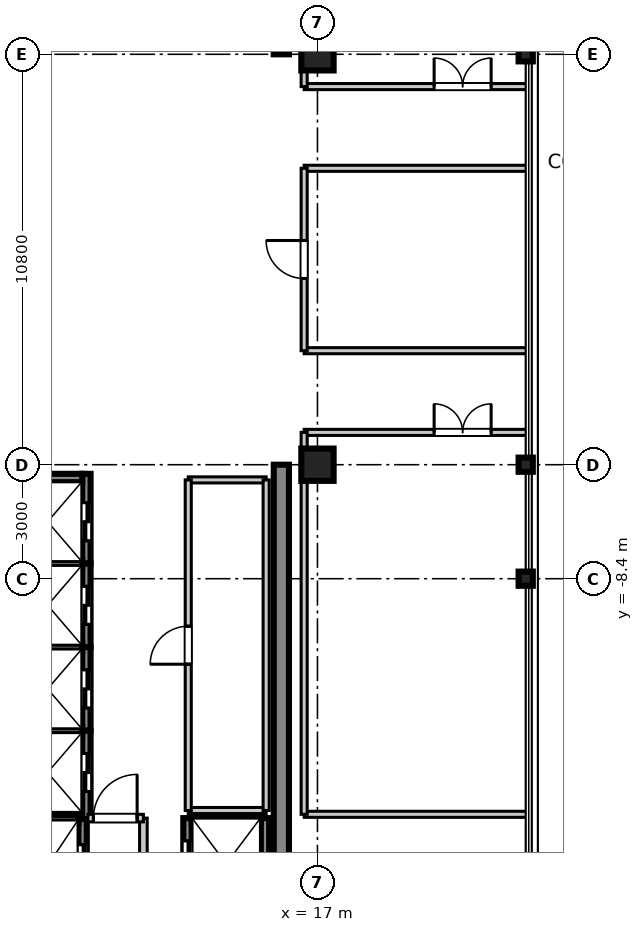
"""IFC4 building model, lengths in metres.
Left out: names, types, materials, properties, quantities, classifications, styles, units other than length and angle.
Written with IfcOpenShell. Run it as: python <this file> out.ifc"""

import sys

from ifc_helpers import new_model, si_unit, direction, frame, frame_2d, origin, origin_2d, place, context, subcontext, project, spatial, rectangle, i_section, extrude, source, transform, mapped, element, fill, save


model = new_model("IFC4")
c1 = context("Model", 3, precision=1e-05, world=origin(), true_north=direction((0.0, 1.0)))
c2 = subcontext(c1, "Body", "Model", "MODEL_VIEW")
j1 = project(units=[si_unit("LENGTHUNIT", "METRE"), si_unit("PLANEANGLEUNIT", "RADIAN")], contexts=[c1])
p1 = place(None, origin())
s1 = spatial("IfcSite", under=j1, at=p1, CompositionType="ELEMENT")
p2 = place(p1, origin())
s2 = spatial("IfcBuilding", under=s1, at=p2, CompositionType="ELEMENT")
p3 = place(p2, frame((0.0, 0.0, 343.05)))
s3 = spatial("IfcBuildingStorey", under=s2, at=p3, CompositionType="ELEMENT", Elevation=343.05)
m1 = source(origin(), c2, "Body", "SweptSolid", [
    extrude(rectangle(XDim=0.85, YDim=0.85, at=origin_2d()), origin(), (0.0, 0.0, 1.0), 4.455),
])
for number, where, z_axis, x_axis in (
    (1, (17.0, -5.4, 0.0), (0.0, 0.0, 1.0), (1.0, 0.0, 0.0)),
    (2, (17.0, 5.4, 0.0), (0.0, 0.0, 1.0), (1.0, 0.0, 0.0)),
):
    element("IfcColumn", number, at=place(p3, frame(where, z_axis=z_axis, x_axis=x_axis)), inside=s3, PredefinedType="PILASTER", context=c2, shape_type="MappedRepresentation", body=[
        mapped(m1, transform((0.0, 0.0, 0.0), scale=1.0)),
    ])
m2 = source(origin(), c2, "Body", "SweptSolid", [
    extrude(i_section(OverallWidth=0.374, OverallDepth=0.374, WebThickness=0.014, FlangeThickness=0.023, at=origin_2d()), origin(), (0.0, 0.0, 1.0), 4.455),
])
for number, where, z_axis, x_axis in (
    (3, (22.48, -8.4, 0.0), (0.0, 0.0, 1.0), (1.0, 0.0, 0.0)),
    (4, (22.48, -5.4, 0.0), (0.0, 0.0, 1.0), (1.0, 0.0, 0.0)),
    (5, (22.48, 5.4, 0.0), (0.0, 0.0, 1.0), (1.0, 0.0, 0.0)),
):
    element("IfcColumn", number, at=place(p3, frame(where, z_axis=z_axis, x_axis=x_axis)), inside=s3, PredefinedType="COLUMN", context=c2, shape_type="MappedRepresentation", body=[
        mapped(m2, transform((0.0, 0.0, 0.0), scale=1.0)),
    ])
m3 = source(origin(), c2, "Body", "SweptSolid", [
    extrude(rectangle(XDim=11.6, YDim=0.4, at=frame_2d((5.8, 0.0))), origin(), (0.0, 0.0, 1.0), 4.17),
])
for number, where, z_axis, x_axis in (
    (6, (16.05, 5.4, 0.0), (0.0, 0.0, 1.0), (0.0, 1.0, 0.0)),
    (7, (16.05, -17.0, 0.0), (0.0, 0.0, 1.0), (0.0, 1.0, 0.0)),
):
    element("IfcWall", number, at=place(p3, frame(where, z_axis=z_axis, x_axis=x_axis)), inside=s3, PredefinedType="SHEAR", context=c2, shape_type="MappedRepresentation", body=[
        mapped(m3, transform((0.0, 0.0, 0.0), scale=1.0)),
    ])
m4 = source(origin(), c2, "Body", "SweptSolid", [
    extrude(rectangle(XDim=2.36, YDim=0.22, at=frame_2d((1.18, 0.0))), origin(), (0.0, 0.0, 1.0), 4.17),
])
p4 = place(p3, frame((10.92, -8.0, 0.0), z_axis=(0.0, 0.0, 1.0), x_axis=(0.0, 1.0, 0.0)))
e8 = element("IfcWall", 8, at=p4, inside=s3, PredefinedType="SHEAR", context=c2, shape_type="MappedRepresentation", body=[
    mapped(m4, transform((0.0, 0.0, 0.0), scale=1.0)),
])
p5 = place(p4, frame((0.6, 0.0, 0.0)))
e9 = element("IfcOpeningElement", 9, at=p5, cuts=e8, PredefinedType="OPENING", context=c2, shape_type="SweptSolid", body=[
    extrude(rectangle(XDim=1.0, YDim=2.2, at=frame_2d((0.5, 1.1))), frame((0.0, 0.12, 0.0), z_axis=(0.0, -1.0, 0.0), x_axis=(1.0, 0.0, 0.0)), (0.0, 0.0, 1.0), 0.24),
])
m5 = source(origin(), c2, "Body", "SweptSolid", [
    extrude(rectangle(XDim=1.82, YDim=0.22, at=frame_2d((0.91, 0.0))), origin(), (0.0, 0.0, 1.0), 4.17),
])
p6 = place(p3, frame((8.99, -5.75, 0.0), z_axis=(0.0, 0.0, 1.0), x_axis=(1.0, 0.0, 0.0)))
e10 = element("IfcWall", 10, at=p6, inside=s3, PredefinedType="SHEAR", context=c2, shape_type="MappedRepresentation", body=[
    mapped(m5, transform((0.0, 0.0, 0.0), scale=1.0)),
])
m6 = source(origin(), c2, "Body", "SweptSolid", [
    extrude(rectangle(XDim=2.2, YDim=0.22, at=frame_2d((1.1, 0.0))), origin(), (0.0, 0.0, 1.0), 4.17),
])
p7 = place(p3, frame((10.92, -10.2, 0.0), z_axis=(0.0, 0.0, 1.0), x_axis=(0.0, 1.0, 0.0)))
e11 = element("IfcWall", 11, at=p7, inside=s3, PredefinedType="SHEAR", context=c2, shape_type="MappedRepresentation", body=[
    mapped(m6, transform((0.0, 0.0, 0.0), scale=1.0)),
])
p8 = place(p7, frame((0.6, 0.0, 0.0)))
e12 = element("IfcOpeningElement", 12, at=p8, cuts=e11, PredefinedType="OPENING", context=c2, shape_type="SweptSolid", body=[
    extrude(rectangle(XDim=1.0, YDim=2.2, at=frame_2d((0.5, 1.1))), frame((0.0, 0.12, 0.0), z_axis=(0.0, -1.0, 0.0), x_axis=(1.0, 0.0, 0.0)), (0.0, 0.0, 1.0), 0.24),
])
m7 = source(origin(), c2, "Body", "SweptSolid", [
    extrude(rectangle(XDim=1.82, YDim=0.22, at=frame_2d((0.91, 0.0))), origin(), (0.0, 0.0, 1.0), 4.5),
])
p9 = place(p3, frame((8.99, -8.0, 0.0), z_axis=(0.0, 0.0, 1.0), x_axis=(1.0, 0.0, 0.0)))
e13 = element("IfcWall", 13, at=p9, inside=s3, PredefinedType="SHEAR", context=c2, shape_type="MappedRepresentation", body=[
    mapped(m7, transform((0.0, 0.0, 0.0), scale=1.0)),
])
p10 = place(p3, frame((10.92, -12.4, 0.0), z_axis=(0.0, 0.0, 1.0), x_axis=(0.0, 1.0, 0.0)))
e14 = element("IfcWall", 14, at=p10, inside=s3, PredefinedType="SHEAR", context=c2, shape_type="MappedRepresentation", body=[
    mapped(m6, transform((0.0, 0.0, 0.0), scale=1.0)),
])
p11 = place(p10, frame((0.6, 0.0, 0.0)))
e15 = element("IfcOpeningElement", 15, at=p11, cuts=e14, PredefinedType="OPENING", context=c2, shape_type="SweptSolid", body=[
    extrude(rectangle(XDim=1.0, YDim=2.2, at=frame_2d((0.5, 1.1))), frame((0.0, 0.12, 0.0), z_axis=(0.0, -1.0, 0.0), x_axis=(1.0, 0.0, 0.0)), (0.0, 0.0, 1.0), 0.24),
])
p12 = place(p3, frame((8.99, -10.2, 0.0), z_axis=(0.0, 0.0, 1.0), x_axis=(1.0, 0.0, 0.0)))
e16 = element("IfcWall", 16, at=p12, inside=s3, PredefinedType="SHEAR", context=c2, shape_type="MappedRepresentation", body=[
    mapped(m7, transform((0.0, 0.0, 0.0), scale=1.0)),
])
m8 = source(origin(), c2, "Body", "SweptSolid", [
    extrude(rectangle(XDim=2.325, YDim=0.22, at=frame_2d((1.163, 0.0))), origin(), (0.0, 0.0, 1.0), 4.17),
])
p13 = place(p3, frame((10.92, -14.725, 0.0), z_axis=(0.0, 0.0, 1.0), x_axis=(0.0, 1.0, 0.0)))
e17 = element("IfcWall", 17, at=p13, inside=s3, PredefinedType="SHEAR", context=c2, shape_type="MappedRepresentation", body=[
    mapped(m8, transform((0.0, 0.0, 0.0), scale=1.0)),
])
p14 = place(p13, frame((0.725, 0.0, 0.0)))
e18 = element("IfcOpeningElement", 18, at=p14, cuts=e17, PredefinedType="OPENING", context=c2, shape_type="SweptSolid", body=[
    extrude(rectangle(XDim=1.0, YDim=2.2, at=frame_2d((0.5, 1.1))), frame((0.0, 0.12, 0.0), z_axis=(0.0, -1.0, 0.0), x_axis=(1.0, 0.0, 0.0)), (0.0, 0.0, 1.0), 0.24),
])
p15 = place(p3, frame((8.99, -12.4, 0.0), z_axis=(0.0, 0.0, 1.0), x_axis=(1.0, 0.0, 0.0)))
e19 = element("IfcWall", 19, at=p15, inside=s3, PredefinedType="SHEAR", context=c2, shape_type="MappedRepresentation", body=[
    mapped(m7, transform((0.0, 0.0, 0.0), scale=1.0)),
])
m9 = source(origin(), c2, "Body", "SweptSolid", [
    extrude(rectangle(XDim=2.635, YDim=0.22, at=frame_2d((1.317, 0.0))), origin(), (0.0, 0.0, 1.0), 4.17),
])
p16 = place(p3, frame((10.82, -17.36, 0.0), z_axis=(0.0, 0.0, 1.0), x_axis=(0.0, 1.0, 0.0)))
e20 = element("IfcWall", 20, at=p16, inside=s3, PredefinedType="SHEAR", context=c2, shape_type="MappedRepresentation", body=[
    mapped(m9, transform((0.0, 0.0, 0.0), scale=1.0)),
])
p17 = place(p16, frame((0.86, 0.0, 0.0)))
e21 = element("IfcOpeningElement", 21, at=p17, cuts=e20, PredefinedType="OPENING", context=c2, shape_type="SweptSolid", body=[
    extrude(rectangle(XDim=1.1, YDim=2.2, at=frame_2d((0.55, 1.1))), frame((0.0, 0.12, 0.0), z_axis=(0.0, -1.0, 0.0), x_axis=(1.0, 0.0, 0.0)), (0.0, 0.0, 1.0), 0.24),
])
m10 = source(origin(), c2, "Body", "SweptSolid", [
    extrude(rectangle(XDim=1.62, YDim=0.22, at=frame_2d((0.81, 0.0))), origin(), (0.0, 0.0, 1.0), 4.5),
])
p18 = place(p3, frame((9.09, -14.725, 0.0), z_axis=(0.0, 0.0, 1.0), x_axis=(1.0, 0.0, 0.0)))
e22 = element("IfcWall", 22, at=p18, inside=s3, PredefinedType="SHEAR", context=c2, shape_type="MappedRepresentation", body=[
    mapped(m10, transform((0.0, 0.0, 0.0), scale=1.0)),
])
m11 = source(origin(), c2, "Body", "SweptSolid", [
    extrude(rectangle(XDim=2.61, YDim=0.22, at=frame_2d((1.305, 0.0))), origin(), (0.0, 0.0, 1.0), 4.17),
])
p19 = place(p3, frame((13.58, -17.31, 0.0), z_axis=(0.0, 0.0, 1.0), x_axis=(0.0, 1.0, 0.0)))
e23 = element("IfcWall", 23, at=p19, inside=s3, PredefinedType="SHEAR", context=c2, shape_type="MappedRepresentation", body=[
    mapped(m11, transform((0.0, 0.0, 0.0), scale=1.0)),
])
p20 = place(p19, frame((0.81, 0.0, 0.0)))
e24 = element("IfcOpeningElement", 24, at=p20, cuts=e23, PredefinedType="OPENING", context=c2, shape_type="SweptSolid", body=[
    extrude(rectangle(XDim=1.2, YDim=2.2, at=frame_2d((0.6, 1.1))), frame((0.0, 0.12, 0.0), z_axis=(0.0, -1.0, 0.0), x_axis=(1.0, 0.0, 0.0)), (0.0, 0.0, 1.0), 0.24),
])
p21 = place(p3, frame((15.62, -17.31, 0.0), z_axis=(0.0, 0.0, 1.0), x_axis=(0.0, 1.0, 0.0)))
e25 = element("IfcWall", 25, at=p21, inside=s3, PredefinedType="SHEAR", context=c2, shape_type="MappedRepresentation", body=[
    mapped(m11, transform((0.0, 0.0, 0.0), scale=1.0)),
])
p22 = place(p3, frame((13.69, -14.7, 0.0), z_axis=(0.0, 0.0, 1.0), x_axis=(1.0, 0.0, 0.0)))
e26 = element("IfcWall", 26, at=p22, inside=s3, PredefinedType="SHEAR", context=c2, shape_type="MappedRepresentation", body=[
    mapped(m7, transform((0.0, 0.0, 0.0), scale=1.0)),
])
m12 = source(origin(), c2, "Body", "SweptSolid", [
    extrude(rectangle(XDim=5.1, YDim=0.2, at=frame_2d((2.55, 0.0))), origin(), (0.0, 0.0, 1.0), 3.4),
])
p23 = place(p3, frame((12.42, -19.8, 0.0), z_axis=(0.0, 0.0, 1.0), x_axis=(0.0, 1.0, 0.0)))
e27 = element("IfcWall", 27, at=p23, inside=s3, PredefinedType="PARTITIONING", context=c2, shape_type="MappedRepresentation", body=[
    mapped(m12, transform((0.0, 0.0, 0.0), scale=1.0)),
])
m13 = source(origin(), c2, "Body", "SweptSolid", [
    extrude(rectangle(XDim=1.46, YDim=0.2, at=frame_2d((0.73, 0.0))), origin(), (0.0, 0.0, 1.0), 3.4),
])
p24 = place(p3, frame((10.96, -14.7, 0.0), z_axis=(0.0, 0.0, 1.0), x_axis=(1.0, 0.0, 0.0)))
e28 = element("IfcWall", 28, at=p24, inside=s3, PredefinedType="PARTITIONING", context=c2, shape_type="MappedRepresentation", body=[
    mapped(m13, transform((0.0, 0.0, 0.0), scale=1.0)),
])
p25 = place(p24, frame((0.145, 0.0, 0.0)))
e29 = element("IfcOpeningElement", 29, at=p25, cuts=e28, PredefinedType="OPENING", context=c2, shape_type="SweptSolid", body=[
    extrude(rectangle(XDim=1.15, YDim=2.15, at=frame_2d((0.575, 1.075))), frame((0.0, 0.11, 0.0), z_axis=(0.0, -1.0, 0.0), x_axis=(1.0, 0.0, 0.0)), (0.0, 0.0, 1.0), 0.22),
])
m14 = source(origin(), c2, "Body", "SweptSolid", [
    extrude(rectangle(XDim=2.05, YDim=0.16, at=frame_2d((1.025, 0.0))), origin(), (0.0, 0.0, 1.0), 3.4),
])
for number, where, z_axis, x_axis in (
    (30, (13.6, -14.5, 0.0), (0.0, 0.0, 1.0), (1.0, 0.0, 0.0)),
    (31, (13.6, -5.8, 0.0), (0.0, 0.0, 1.0), (1.0, 0.0, 0.0)),
):
    element("IfcWall", number, at=place(p3, frame(where, z_axis=z_axis, x_axis=x_axis)), inside=s3, PredefinedType="PARTITIONING", context=c2, shape_type="MappedRepresentation", body=[
        mapped(m14, transform((0.0, 0.0, 0.0), scale=1.0)),
    ])
m15 = source(origin(), c2, "Body", "SweptSolid", [
    extrude(rectangle(XDim=8.7, YDim=0.16, at=frame_2d((4.35, 0.0))), origin(), (0.0, 0.0, 1.0), 3.4),
])
p26 = place(p3, frame((13.6, -14.5, 0.0), z_axis=(0.0, 0.0, 1.0), x_axis=(0.0, 1.0, 0.0)))
e32 = element("IfcWall", 32, at=p26, inside=s3, PredefinedType="PARTITIONING", context=c2, shape_type="MappedRepresentation", body=[
    mapped(m15, transform((0.0, 0.0, 0.0), scale=1.0)),
])
p27 = place(p26, frame((3.85, 0.0, 0.0)))
e33 = element("IfcOpeningElement", 33, at=p27, cuts=e32, PredefinedType="OPENING", context=c2, shape_type="SweptSolid", body=[
    extrude(rectangle(XDim=1.0, YDim=2.1, at=frame_2d((0.5, 1.05))), frame((0.0, 0.09, 0.0), z_axis=(0.0, -1.0, 0.0), x_axis=(1.0, 0.0, 0.0)), (0.0, 0.0, 1.0), 0.18),
])
p28 = place(p3, frame((15.65, -14.5, 0.0), z_axis=(0.0, 0.0, 1.0), x_axis=(0.0, 1.0, 0.0)))
e34 = element("IfcWall", 34, at=p28, inside=s3, PredefinedType="PARTITIONING", context=c2, shape_type="MappedRepresentation", body=[
    mapped(m15, transform((0.0, 0.0, 0.0), scale=1.0)),
])
m16 = source(origin(), c2, "Body", "SweptSolid", [
    extrude(rectangle(XDim=5.85, YDim=0.16, at=frame_2d((2.925, 0.0))), origin(), (0.0, 0.0, 1.0), 3.4),
])
for number, where, z_axis, x_axis in (
    (35, (16.65, -2.4, 0.0), (0.0, 0.0, 1.0), (1.0, 0.0, 0.0)),
    (36, (16.65, 2.4, 0.0), (0.0, 0.0, 1.0), (1.0, 0.0, 0.0)),
):
    element("IfcWall", number, at=place(p3, frame(where, z_axis=z_axis, x_axis=x_axis)), inside=s3, PredefinedType="PARTITIONING", context=c2, shape_type="MappedRepresentation", body=[
        mapped(m16, transform((0.0, 0.0, 0.0), scale=1.0)),
    ])
m17 = source(origin(), c2, "Body", "SweptSolid", [
    extrude(rectangle(XDim=4.8, YDim=0.16, at=frame_2d((2.4, 0.0))), origin(), (0.0, 0.0, 1.0), 3.4),
])
p29 = place(p3, frame((16.65, -2.4, 0.0), z_axis=(0.0, 0.0, 1.0), x_axis=(0.0, 1.0, 0.0)))
e37 = element("IfcWall", 37, at=p29, inside=s3, PredefinedType="PARTITIONING", context=c2, shape_type="MappedRepresentation", body=[
    mapped(m17, transform((0.0, 0.0, 0.0), scale=1.0)),
])
p30 = place(p29, frame((1.9, 0.0, 0.0)))
e38 = element("IfcOpeningElement", 38, at=p30, cuts=e37, PredefinedType="OPENING", context=c2, shape_type="SweptSolid", body=[
    extrude(rectangle(XDim=1.0, YDim=2.1, at=frame_2d((0.5, 1.05))), frame((0.0, 0.09, 0.0), z_axis=(0.0, -1.0, 0.0), x_axis=(1.0, 0.0, 0.0)), (0.0, 0.0, 1.0), 0.18),
])
p31 = place(p3, frame((16.65, 4.55, 0.0), z_axis=(0.0, 0.0, 1.0), x_axis=(1.0, 0.0, 0.0)))
e39 = element("IfcWall", 39, at=p31, inside=s3, PredefinedType="PARTITIONING", context=c2, shape_type="MappedRepresentation", body=[
    mapped(m16, transform((0.0, 0.0, 0.0), scale=1.0)),
])
p32 = place(p31, frame((3.42, 0.0, 0.0)))
e40 = element("IfcOpeningElement", 40, at=p32, cuts=e39, PredefinedType="OPENING", context=c2, shape_type="SweptSolid", body=[
    extrude(rectangle(XDim=1.5, YDim=2.15, at=frame_2d((0.75, 1.075))), frame((0.0, 0.09, 0.0), z_axis=(0.0, -1.0, 0.0), x_axis=(1.0, 0.0, 0.0)), (0.0, 0.0, 1.0), 0.18),
])
m18 = source(origin(), c2, "Body", "SweptSolid", [
    extrude(rectangle(XDim=17.95, YDim=0.16, at=frame_2d((8.975, 0.0))), origin(), (0.0, 0.0, 1.0), 3.4),
])
p33 = place(p3, frame((16.65, 4.55, 0.0), z_axis=(0.0, 0.0, 1.0), x_axis=(0.0, 1.0, 0.0)))
e41 = element("IfcWall", 41, at=p33, inside=s3, PredefinedType="PARTITIONING", context=c2, shape_type="MappedRepresentation", body=[
    mapped(m18, transform((0.0, 0.0, 0.0), scale=1.0)),
])
p34 = place(p3, frame((16.65, -14.6, 0.0), z_axis=(0.0, 0.0, 1.0), x_axis=(1.0, 0.0, 0.0)))
e42 = element("IfcWall", 42, at=p34, inside=s3, PredefinedType="PARTITIONING", context=c2, shape_type="MappedRepresentation", body=[
    mapped(m16, transform((0.0, 0.0, 0.0), scale=1.0)),
])
p35 = place(p3, frame((16.65, -4.55, 0.0), z_axis=(0.0, 0.0, 1.0), x_axis=(1.0, 0.0, 0.0)))
e43 = element("IfcWall", 43, at=p35, inside=s3, PredefinedType="PARTITIONING", context=c2, shape_type="MappedRepresentation", body=[
    mapped(m16, transform((0.0, 0.0, 0.0), scale=1.0)),
])
p36 = place(p35, frame((3.42, 0.0, 0.0)))
e44 = element("IfcOpeningElement", 44, at=p36, cuts=e43, PredefinedType="OPENING", context=c2, shape_type="SweptSolid", body=[
    extrude(rectangle(XDim=1.5, YDim=2.15, at=frame_2d((0.75, 1.075))), frame((0.0, 0.09, 0.0), z_axis=(0.0, -1.0, 0.0), x_axis=(1.0, 0.0, 0.0)), (0.0, 0.0, 1.0), 0.18),
])
m19 = source(origin(), c2, "Body", "SweptSolid", [
    extrude(rectangle(XDim=10.05, YDim=0.16, at=frame_2d((5.025, 0.0))), origin(), (0.0, 0.0, 1.0), 3.4),
])
p37 = place(p3, frame((16.65, -14.6, 0.0), z_axis=(0.0, 0.0, 1.0), x_axis=(0.0, 1.0, 0.0)))
e45 = element("IfcWall", 45, at=p37, inside=s3, PredefinedType="PARTITIONING", context=c2, shape_type="MappedRepresentation", body=[
    mapped(m19, transform((0.0, 0.0, 0.0), scale=1.0)),
])
m20 = source(origin(), c2, "Body", "SweptSolid", [
    extrude(rectangle(XDim=1.0, YDim=2.2, at=frame_2d((0.5, 1.1))), frame((0.0, 0.025, 0.0), z_axis=(0.0, -1.0, 0.0), x_axis=(1.0, 0.0, 0.0)), (0.0, 0.0, 1.0), 0.05),
])
p38 = place(p5, frame((1.0, 0.0, 0.0), z_axis=(0.0, 0.0, 1.0), x_axis=(-1.0, 0.0, 0.0)))
e46 = element("IfcDoor", 46, at=p38, inside=s3, OperationType="DOUBLE_DOOR_SLIDING", PredefinedType="DOOR", context=c2, shape_type="MappedRepresentation", body=[
    mapped(m20, transform((0.0, 0.0, 0.0), scale=1.0)),
])
fill(e9, e46)
p39 = place(p8, frame((1.0, 0.0, 0.0), z_axis=(0.0, 0.0, 1.0), x_axis=(-1.0, 0.0, 0.0)))
e47 = element("IfcDoor", 47, at=p39, inside=s3, OperationType="DOUBLE_DOOR_SLIDING", PredefinedType="DOOR", context=c2, shape_type="MappedRepresentation", body=[
    mapped(m20, transform((0.0, 0.0, 0.0), scale=1.0)),
])
fill(e12, e47)
p40 = place(p11, frame((1.0, 0.0, 0.0), z_axis=(0.0, 0.0, 1.0), x_axis=(-1.0, 0.0, 0.0)))
e48 = element("IfcDoor", 48, at=p40, inside=s3, OperationType="DOUBLE_DOOR_SLIDING", PredefinedType="DOOR", context=c2, shape_type="MappedRepresentation", body=[
    mapped(m20, transform((0.0, 0.0, 0.0), scale=1.0)),
])
fill(e15, e48)
p41 = place(p14, frame((1.0, 0.0, 0.0), z_axis=(0.0, 0.0, 1.0), x_axis=(-1.0, 0.0, 0.0)))
e49 = element("IfcDoor", 49, at=p41, inside=s3, OperationType="DOUBLE_DOOR_SLIDING", PredefinedType="DOOR", context=c2, shape_type="MappedRepresentation", body=[
    mapped(m20, transform((0.0, 0.0, 0.0), scale=1.0)),
])
fill(e18, e49)
m21 = source(origin(), c2, "Body", "SweptSolid", [
    extrude(rectangle(XDim=1.1, YDim=2.2, at=frame_2d((0.55, 1.1))), frame((0.0, 0.025, 0.0), z_axis=(0.0, -1.0, 0.0), x_axis=(1.0, 0.0, 0.0)), (0.0, 0.0, 1.0), 0.05),
])
p42 = place(p17, frame((1.1, 0.0, 0.0), z_axis=(0.0, 0.0, 1.0), x_axis=(-1.0, 0.0, 0.0)))
e50 = element("IfcDoor", 50, at=p42, inside=s3, OperationType="DOUBLE_DOOR_SLIDING", PredefinedType="DOOR", context=c2, shape_type="MappedRepresentation", body=[
    mapped(m21, transform((0.0, 0.0, 0.0), scale=1.0)),
])
fill(e21, e50)
m22 = source(origin(), c2, "Body", "SweptSolid", [
    extrude(rectangle(XDim=1.2, YDim=2.2, at=frame_2d((0.6, 1.1))), frame((0.0, 0.025, 0.0), z_axis=(0.0, -1.0, 0.0), x_axis=(1.0, 0.0, 0.0)), (0.0, 0.0, 1.0), 0.05),
])
p43 = place(p20, origin())
e51 = element("IfcDoor", 51, at=p43, inside=s3, OperationType="DOUBLE_DOOR_SLIDING", PredefinedType="DOOR", context=c2, shape_type="MappedRepresentation", body=[
    mapped(m22, transform((0.0, 0.0, 0.0), scale=1.0)),
])
fill(e24, e51)
m23 = source(origin(), c2, "Body", "SweptSolid", [
    extrude(rectangle(XDim=1.15, YDim=2.15, at=frame_2d((0.575, 1.075))), frame((0.0, 0.025, 0.0), z_axis=(0.0, -1.0, 0.0), x_axis=(1.0, 0.0, 0.0)), (0.0, 0.0, 1.0), 0.05),
])
p44 = place(p25, origin())
e52 = element("IfcDoor", 52, at=p44, inside=s3, OperationType="SINGLE_SWING_RIGHT", PredefinedType="DOOR", context=c2, shape_type="MappedRepresentation", body=[
    mapped(m23, transform((0.0, 0.0, 0.0), scale=1.0)),
])
fill(e29, e52)
m24 = source(origin(), c2, "Body", "SweptSolid", [
    extrude(rectangle(XDim=1.0, YDim=2.1, at=frame_2d((0.5, 1.05))), frame((0.0, 0.025, 0.0), z_axis=(0.0, -1.0, 0.0), x_axis=(1.0, 0.0, 0.0)), (0.0, 0.0, 1.0), 0.05),
])
p45 = place(p27, frame((1.0, 0.0, 0.0), z_axis=(0.0, 0.0, 1.0), x_axis=(-1.0, 0.0, 0.0)))
e53 = element("IfcDoor", 53, at=p45, inside=s3, OperationType="SINGLE_SWING_LEFT", PredefinedType="DOOR", context=c2, shape_type="MappedRepresentation", body=[
    mapped(m24, transform((0.0, 0.0, 0.0), scale=1.0)),
])
fill(e33, e53)
p46 = place(p30, frame((1.0, 0.0, 0.0), z_axis=(0.0, 0.0, 1.0), x_axis=(-1.0, 0.0, 0.0)))
e54 = element("IfcDoor", 54, at=p46, inside=s3, OperationType="SINGLE_SWING_RIGHT", PredefinedType="DOOR", context=c2, shape_type="MappedRepresentation", body=[
    mapped(m24, transform((0.0, 0.0, 0.0), scale=1.0)),
])
fill(e38, e54)
m25 = source(origin(), c2, "Body", "SweptSolid", [
    extrude(rectangle(XDim=1.5, YDim=2.15, at=frame_2d((0.75, 1.075))), frame((0.0, 0.025, 0.0), z_axis=(0.0, -1.0, 0.0), x_axis=(1.0, 0.0, 0.0)), (0.0, 0.0, 1.0), 0.05),
])
p47 = place(p32, origin())
e55 = element("IfcDoor", 55, at=p47, inside=s3, OperationType="DOUBLE_DOOR_SINGLE_SWING", PredefinedType="DOOR", context=c2, shape_type="MappedRepresentation", body=[
    mapped(m25, transform((0.0, 0.0, 0.0), scale=1.0)),
])
fill(e40, e55)
p48 = place(p36, frame((1.5, 0.0, 0.0), z_axis=(0.0, 0.0, 1.0), x_axis=(-1.0, 0.0, 0.0)))
e56 = element("IfcDoor", 56, at=p48, inside=s3, OperationType="DOUBLE_DOOR_SINGLE_SWING", PredefinedType="DOOR", context=c2, shape_type="MappedRepresentation", body=[
    mapped(m25, transform((0.0, 0.0, 0.0), scale=1.0)),
])
fill(e44, e56)
save(model, sys.argv[1])
